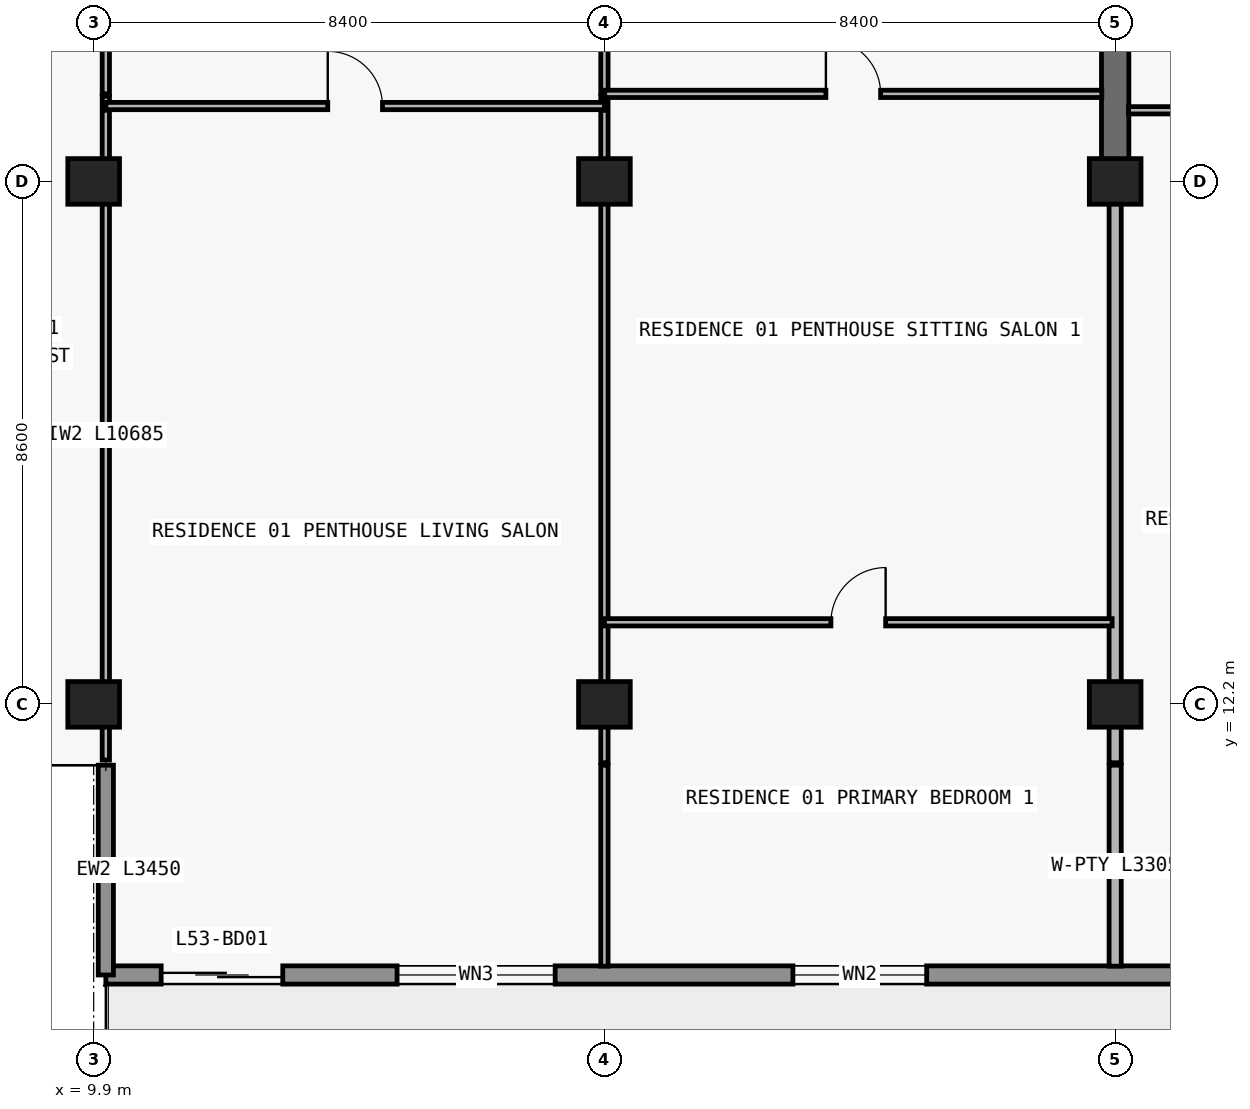
"""IFC4 building model, lengths in metres.
Left out: names, types, materials, properties, quantities, classifications, styles, units other than length and angle.
Written with IfcOpenShell. Run it as: python <this file> out.ifc"""

import sys

from ifc_helpers import new_model, si_unit, direction, frame, frame_2d, origin, origin_2d, place, context, subcontext, project, spatial, rectangle, extrude, element, fill, save


model = new_model("IFC4")
c1 = context("Model", 3, precision=1e-05, world=origin(), true_north=direction((0.0, 1.0)))
c2 = subcontext(c1, "Body", "Model", "MODEL_VIEW")
j1 = project(units=[si_unit("LENGTHUNIT", "METRE"), si_unit("PLANEANGLEUNIT", "RADIAN")], contexts=[c1])
p1 = place(None, origin())
s1 = spatial("IfcSite", under=j1, at=p1, CompositionType="ELEMENT")
p2 = place(p1, origin())
s2 = spatial("IfcBuilding", under=s1, at=p2, CompositionType="ELEMENT")
p3 = place(p2, frame((0.0, 0.0, 191.7)))
s3 = spatial("IfcBuildingStorey", under=s2, at=p3, CompositionType="ELEMENT", Elevation=191.7)
for number, where, z_axis, x_axis in (
    (1, (9.9, 12.2, 0.0), (0.0, 0.0, 1.0), (1.0, 0.0, 0.0)),
    (2, (18.3, 12.2, 0.0), (0.0, 0.0, 1.0), (1.0, 0.0, 0.0)),
    (3, (26.7, 12.2, 0.0), (0.0, 0.0, 1.0), (1.0, 0.0, 0.0)),
    (4, (9.9, 20.8, 0.0), (0.0, 0.0, 1.0), (1.0, 0.0, 0.0)),
    (5, (18.3, 20.8, 0.0), (0.0, 0.0, 1.0), (1.0, 0.0, 0.0)),
    (6, (26.7, 20.8, 0.0), (0.0, 0.0, 1.0), (1.0, 0.0, 0.0)),
):
    element("IfcColumn", number, at=place(p3, frame(where, z_axis=z_axis, x_axis=x_axis)), inside=s3, PredefinedType="COLUMN", context=c2, shape_type="SweptSolid", body=[
        extrude(rectangle(XDim=0.85, YDim=0.75, at=origin_2d()), origin(), (0.0, 0.0, 1.0), 3.05),
    ])
p4 = place(p3, frame((26.7, 20.8, 0.0), z_axis=(0.0, 0.0, 1.0), x_axis=(0.0, 1.0, 0.0)))
e7 = element("IfcWall", 7, at=p4, inside=s3, PredefinedType="SHEAR", context=c2, shape_type="SweptSolid", body=[
    extrude(rectangle(XDim=8.6, YDim=0.45, at=frame_2d((4.3, 0.0))), origin(), (0.0, 0.0, 1.0), 3.05),
])
p5 = place(p3, frame((67.7, 7.75, 0.0), z_axis=(0.0, 0.0, 1.0), x_axis=(-1.0, 0.0, 0.0)))
e8 = element("IfcWall", 8, at=p5, inside=s3, PredefinedType="STANDARD", context=c2, shape_type="SweptSolid", body=[
    extrude(rectangle(XDim=57.6, YDim=0.3, at=frame_2d((28.8, 0.0))), origin(), (0.0, 0.0, 1.0), 3.05),
])
p6 = place(p5, frame((54.69, 0.0, 0.0)))
e9 = element("IfcOpeningElement", 9, at=p6, cuts=e8, PredefinedType="OPENING", context=c2, shape_type="SweptSolid", body=[
    extrude(rectangle(XDim=2.0, YDim=2.3, at=frame_2d((1.0, 1.15))), frame((0.0, 0.16, 0.0), z_axis=(0.0, -1.0, 0.0), x_axis=(1.0, 0.0, 0.0)), (0.0, 0.0, 1.0), 0.32),
])
p7 = place(p5, frame((50.21, 0.0, 0.65)))
e10 = element("IfcOpeningElement", 10, at=p7, cuts=e8, PredefinedType="OPENING", context=c2, shape_type="SweptSolid", body=[
    extrude(rectangle(XDim=2.6, YDim=1.85, at=frame_2d((1.3, 0.925))), frame((0.0, 0.16, 0.0), z_axis=(0.0, -1.0, 0.0), x_axis=(1.0, 0.0, 0.0)), (0.0, 0.0, 1.0), 0.32),
])
p8 = place(p5, frame((44.1, 0.0, 0.85)))
e11 = element("IfcOpeningElement", 11, at=p8, cuts=e8, PredefinedType="OPENING", context=c2, shape_type="SweptSolid", body=[
    extrude(rectangle(XDim=2.2, YDim=1.55, at=frame_2d((1.1, 0.775))), frame((0.0, 0.16, 0.0), z_axis=(0.0, -1.0, 0.0), x_axis=(1.0, 0.0, 0.0)), (0.0, 0.0, 1.0), 0.32),
])
p9 = place(p5, frame((37.69, 0.0, 0.0)))
e12 = element("IfcOpeningElement", 12, at=p9, cuts=e8, PredefinedType="OPENING", context=c2, shape_type="SweptSolid", body=[
    extrude(rectangle(XDim=2.0, YDim=2.3, at=frame_2d((1.0, 1.15))), frame((0.0, 0.16, 0.0), z_axis=(0.0, -1.0, 0.0), x_axis=(1.0, 0.0, 0.0)), (0.0, 0.0, 1.0), 0.32),
])
p10 = place(p5, frame((33.59, 0.0, 0.85)))
e13 = element("IfcOpeningElement", 13, at=p10, cuts=e8, PredefinedType="OPENING", context=c2, shape_type="SweptSolid", body=[
    extrude(rectangle(XDim=1.8, YDim=1.55, at=frame_2d((0.9, 0.775))), frame((0.0, 0.16, 0.0), z_axis=(0.0, -1.0, 0.0), x_axis=(1.0, 0.0, 0.0)), (0.0, 0.0, 1.0), 0.32),
])
p11 = place(p5, frame((29.69, 0.0, 0.0)))
e14 = element("IfcOpeningElement", 14, at=p11, cuts=e8, PredefinedType="OPENING", context=c2, shape_type="SweptSolid", body=[
    extrude(rectangle(XDim=2.0, YDim=2.3, at=frame_2d((1.0, 1.15))), frame((0.0, 0.16, 0.0), z_axis=(0.0, -1.0, 0.0), x_axis=(1.0, 0.0, 0.0)), (0.0, 0.0, 1.0), 0.32),
])
p12 = place(p5, frame((25.81, 0.0, 0.65)))
e15 = element("IfcOpeningElement", 15, at=p12, cuts=e8, PredefinedType="OPENING", context=c2, shape_type="SweptSolid", body=[
    extrude(rectangle(XDim=2.6, YDim=1.85, at=frame_2d((1.3, 0.925))), frame((0.0, 0.16, 0.0), z_axis=(0.0, -1.0, 0.0), x_axis=(1.0, 0.0, 0.0)), (0.0, 0.0, 1.0), 0.32),
])
p13 = place(p5, frame((19.7, 0.0, 0.85)))
e16 = element("IfcOpeningElement", 16, at=p13, cuts=e8, PredefinedType="OPENING", context=c2, shape_type="SweptSolid", body=[
    extrude(rectangle(XDim=2.2, YDim=1.55, at=frame_2d((1.1, 0.775))), frame((0.0, 0.16, 0.0), z_axis=(0.0, -1.0, 0.0), x_axis=(1.0, 0.0, 0.0)), (0.0, 0.0, 1.0), 0.32),
])
p14 = place(p5, frame((13.29, 0.0, 0.0)))
e17 = element("IfcOpeningElement", 17, at=p14, cuts=e8, PredefinedType="OPENING", context=c2, shape_type="SweptSolid", body=[
    extrude(rectangle(XDim=2.0, YDim=2.3, at=frame_2d((1.0, 1.15))), frame((0.0, 0.16, 0.0), z_axis=(0.0, -1.0, 0.0), x_axis=(1.0, 0.0, 0.0)), (0.0, 0.0, 1.0), 0.32),
])
p15 = place(p5, frame((9.19, 0.0, 0.85)))
e18 = element("IfcOpeningElement", 18, at=p15, cuts=e8, PredefinedType="OPENING", context=c2, shape_type="SweptSolid", body=[
    extrude(rectangle(XDim=1.8, YDim=1.55, at=frame_2d((0.9, 0.775))), frame((0.0, 0.16, 0.0), z_axis=(0.0, -1.0, 0.0), x_axis=(1.0, 0.0, 0.0)), (0.0, 0.0, 1.0), 0.32),
])
p16 = place(p5, frame((5.273, 0.0, 0.0)))
e19 = element("IfcOpeningElement", 19, at=p16, cuts=e8, PredefinedType="OPENING", context=c2, shape_type="SweptSolid", body=[
    extrude(rectangle(XDim=2.0, YDim=2.3, at=frame_2d((1.0, 1.15))), frame((0.0, 0.16, 0.0), z_axis=(0.0, -1.0, 0.0), x_axis=(1.0, 0.0, 0.0)), (0.0, 0.0, 1.0), 0.32),
])
p17 = place(p5, frame((1.073, 0.0, 0.85)))
e20 = element("IfcOpeningElement", 20, at=p17, cuts=e8, PredefinedType="OPENING", context=c2, shape_type="SweptSolid", body=[
    extrude(rectangle(XDim=2.2, YDim=1.55, at=frame_2d((1.1, 0.775))), frame((0.0, 0.16, 0.0), z_axis=(0.0, -1.0, 0.0), x_axis=(1.0, 0.0, 0.0)), (0.0, 0.0, 1.0), 0.32),
])
p18 = place(p3, frame((10.1, 11.2, 0.0), z_axis=(0.0, 0.0, 1.0), x_axis=(0.0, -1.0, 0.0)))
e21 = element("IfcWall", 21, at=p18, inside=s3, PredefinedType="ELEMENTEDWALL", context=c2, shape_type="SweptSolid", body=[
    extrude(rectangle(XDim=3.45, YDim=0.25, at=frame_2d((1.725, 0.0))), origin(), (0.0, 0.0, 1.0), 3.05),
])
p19 = place(p3, frame((10.1, 11.285, 0.0), z_axis=(0.0, 0.0, 1.0), x_axis=(0.0, 1.0, 0.0)))
e22 = element("IfcWall", 22, at=p19, inside=s3, PredefinedType="PARTITIONING", context=c2, shape_type="SweptSolid", body=[
    extrude(rectangle(XDim=10.685, YDim=0.12, at=frame_2d((5.343, 0.0))), origin(), (0.0, 0.0, 1.0), 2.263),
])
p20 = place(p3, frame((10.1, 22.04, 0.0), z_axis=(0.0, 0.0, 1.0), x_axis=(0.0, 1.0, 0.0)))
e23 = element("IfcWall", 23, at=p20, inside=s3, PredefinedType="PARTITIONING", context=c2, shape_type="SweptSolid", body=[
    extrude(rectangle(XDim=0.16, YDim=0.12, at=frame_2d((0.08, 0.0))), origin(), (0.0, 0.0, 1.0), 2.263),
])
p21 = place(p3, frame((10.1, 22.24, 0.0), z_axis=(0.0, 0.0, 1.0), x_axis=(0.0, 1.0, 0.0)))
e24 = element("IfcWall", 24, at=p21, inside=s3, PredefinedType="PARTITIONING", context=c2, shape_type="SweptSolid", body=[
    extrude(rectangle(XDim=4.36, YDim=0.12, at=frame_2d((2.18, 0.0))), origin(), (0.0, 0.0, 1.0), 2.263),
])
p22 = place(p21, frame((1.73, 0.0, 0.0)))
e25 = element("IfcOpeningElement", 25, at=p22, cuts=e24, PredefinedType="OPENING", context=c2, shape_type="SweptSolid", body=[
    extrude(rectangle(XDim=0.9, YDim=2.15, at=frame_2d((0.45, 1.075))), frame((0.0, 0.07, 0.0), z_axis=(0.0, -1.0, 0.0), x_axis=(1.0, 0.0, 0.0)), (0.0, 0.0, 1.0), 0.14),
])
p23 = place(p3, frame((18.3, 7.895, 0.0), z_axis=(0.0, 0.0, 1.0), x_axis=(0.0, 1.0, 0.0)))
e26 = element("IfcWall", 26, at=p23, inside=s3, PredefinedType="PARTITIONING", context=c2, shape_type="SweptSolid", body=[
    extrude(rectangle(XDim=3.305, YDim=0.12, at=frame_2d((1.652, 0.0))), origin(), (0.0, 0.0, 1.0), 3.05),
])
p24 = place(p3, frame((18.3, 11.24, 0.0), z_axis=(0.0, 0.0, 1.0), x_axis=(0.0, 1.0, 0.0)))
e27 = element("IfcWall", 27, at=p24, inside=s3, PredefinedType="PARTITIONING", context=c2, shape_type="SweptSolid", body=[
    extrude(rectangle(XDim=10.73, YDim=0.12, at=frame_2d((5.365, 0.0))), origin(), (0.0, 0.0, 1.0), 2.263),
])
p25 = place(p3, frame((18.3, 22.04, 0.0), z_axis=(0.0, 0.0, 1.0), x_axis=(0.0, 1.0, 0.0)))
e28 = element("IfcWall", 28, at=p25, inside=s3, PredefinedType="PARTITIONING", context=c2, shape_type="SweptSolid", body=[
    extrude(rectangle(XDim=0.16, YDim=0.12, at=frame_2d((0.08, 0.0))), origin(), (0.0, 0.0, 1.0), 2.263),
])
p26 = place(p3, frame((18.3, 22.24, 0.0), z_axis=(0.0, 0.0, 1.0), x_axis=(0.0, 1.0, 0.0)))
e29 = element("IfcWall", 29, at=p26, inside=s3, PredefinedType="PARTITIONING", context=c2, shape_type="SweptSolid", body=[
    extrude(rectangle(XDim=4.36, YDim=0.12, at=frame_2d((2.18, 0.0))), origin(), (0.0, 0.0, 1.0), 2.263),
])
p27 = place(p26, frame((1.73, 0.0, 0.0)))
e30 = element("IfcOpeningElement", 30, at=p27, cuts=e29, PredefinedType="OPENING", context=c2, shape_type="SweptSolid", body=[
    extrude(rectangle(XDim=0.9, YDim=2.15, at=frame_2d((0.45, 1.075))), frame((0.0, 0.07, 0.0), z_axis=(0.0, -1.0, 0.0), x_axis=(1.0, 0.0, 0.0)), (0.0, 0.0, 1.0), 0.14),
])
p28 = place(p3, frame((26.7, 7.895, 0.0), z_axis=(0.0, 0.0, 1.0), x_axis=(0.0, 1.0, 0.0)))
e31 = element("IfcWall", 31, at=p28, inside=s3, PredefinedType="PARTITIONING", context=c2, shape_type="SweptSolid", body=[
    extrude(rectangle(XDim=3.305, YDim=0.2, at=frame_2d((1.652, 0.0))), origin(), (0.0, 0.0, 1.0), 3.05),
])
p29 = place(p3, frame((26.7, 11.24, 0.0), z_axis=(0.0, 0.0, 1.0), x_axis=(0.0, 1.0, 0.0)))
e32 = element("IfcWall", 32, at=p29, inside=s3, PredefinedType="PARTITIONING", context=c2, shape_type="SweptSolid", body=[
    extrude(rectangle(XDim=9.555, YDim=0.2, at=frame_2d((4.777, 0.0))), origin(), (0.0, 0.0, 1.0), 2.263),
])
p30 = place(p3, frame((18.3, 13.55, 0.0), z_axis=(0.0, 0.0, 1.0), x_axis=(1.0, 0.0, 0.0)))
e33 = element("IfcWall", 33, at=p30, inside=s3, PredefinedType="PARTITIONING", context=c2, shape_type="SweptSolid", body=[
    extrude(rectangle(XDim=8.35, YDim=0.12, at=frame_2d((4.175, 0.0))), origin(), (0.0, 0.0, 1.0), 3.05),
])
p31 = place(p30, frame((3.725, 0.0, 0.0)))
e34 = element("IfcOpeningElement", 34, at=p31, cuts=e33, PredefinedType="OPENING", context=c2, shape_type="SweptSolid", body=[
    extrude(rectangle(XDim=0.9, YDim=2.15, at=frame_2d((0.45, 1.075))), frame((0.0, 0.07, 0.0), z_axis=(0.0, -1.0, 0.0), x_axis=(1.0, 0.0, 0.0)), (0.0, 0.0, 1.0), 0.14),
])
p32 = place(p3, frame((26.92, 21.97, 0.0), z_axis=(0.0, 0.0, 1.0), x_axis=(1.0, 0.0, 0.0)))
e35 = element("IfcWall", 35, at=p32, inside=s3, PredefinedType="PARTITIONING", context=c2, shape_type="SweptSolid", body=[
    extrude(rectangle(XDim=4.4, YDim=0.12, at=frame_2d((2.2, 0.0))), origin(), (0.0, 0.0, 1.0), 3.05),
])
p33 = place(p32, frame((1.75, 0.0, 0.0)))
e36 = element("IfcOpeningElement", 36, at=p33, cuts=e35, PredefinedType="OPENING", context=c2, shape_type="SweptSolid", body=[
    extrude(rectangle(XDim=0.9, YDim=2.15, at=frame_2d((0.45, 1.075))), frame((0.0, 0.07, 0.0), z_axis=(0.0, -1.0, 0.0), x_axis=(1.0, 0.0, 0.0)), (0.0, 0.0, 1.0), 0.14),
])
p34 = place(p3, frame((10.1, 22.04, 0.0), z_axis=(0.0, 0.0, 1.0), x_axis=(1.0, 0.0, 0.0)))
e37 = element("IfcWall", 37, at=p34, inside=s3, PredefinedType="PARTITIONING", context=c2, shape_type="SweptSolid", body=[
    extrude(rectangle(XDim=8.2, YDim=0.12, at=frame_2d((4.1, 0.0))), origin(), (0.0, 0.0, 1.0), 3.05),
])
p35 = place(p34, frame((3.65, 0.0, 0.0)))
e38 = element("IfcOpeningElement", 38, at=p35, cuts=e37, PredefinedType="OPENING", context=c2, shape_type="SweptSolid", body=[
    extrude(rectangle(XDim=0.9, YDim=2.15, at=frame_2d((0.45, 1.075))), frame((0.0, 0.07, 0.0), z_axis=(0.0, -1.0, 0.0), x_axis=(1.0, 0.0, 0.0)), (0.0, 0.0, 1.0), 0.14),
])
p36 = place(p3, frame((18.305, 22.24, 0.0), z_axis=(0.0, 0.0, 1.0), x_axis=(1.0, 0.0, 0.0)))
e39 = element("IfcWall", 39, at=p36, inside=s3, PredefinedType="PARTITIONING", context=c2, shape_type="SweptSolid", body=[
    extrude(rectangle(XDim=8.175, YDim=0.12, at=frame_2d((4.087, 0.0))), origin(), (0.0, 0.0, 1.0), 3.05),
])
p37 = place(p36, frame((3.637, 0.0, 0.0)))
e40 = element("IfcOpeningElement", 40, at=p37, cuts=e39, PredefinedType="OPENING", context=c2, shape_type="SweptSolid", body=[
    extrude(rectangle(XDim=0.9, YDim=2.15, at=frame_2d((0.45, 1.075))), frame((0.0, 0.07, 0.0), z_axis=(0.0, -1.0, 0.0), x_axis=(1.0, 0.0, 0.0)), (0.0, 0.0, 1.0), 0.14),
])
p38 = place(p6, origin())
e41 = element("IfcDoor", 41, at=p38, inside=s3, OperationType="DOUBLE_DOOR_SLIDING", PredefinedType="DOOR", context=c2, shape_type="SweptSolid", body=[
    extrude(rectangle(XDim=2.0, YDim=2.3, at=frame_2d((1.0, 1.15))), frame((0.0, 0.025, 0.0), z_axis=(0.0, -1.0, 0.0), x_axis=(1.0, 0.0, 0.0)), (0.0, 0.0, 1.0), 0.05),
])
fill(e9, e41)
p39 = place(p7, origin())
e42 = element("IfcWindow", 42, at=p39, inside=s3, PartitioningType="SINGLE_PANEL", PredefinedType="WINDOW", context=c2, shape_type="SweptSolid", body=[
    extrude(rectangle(XDim=2.6, YDim=1.85, at=frame_2d((1.3, 0.925))), frame((0.0, 0.03, 0.0), z_axis=(0.0, -1.0, 0.0), x_axis=(1.0, 0.0, 0.0)), (0.0, 0.0, 1.0), 0.06),
])
fill(e10, e42)
p40 = place(p8, origin())
e43 = element("IfcWindow", 43, at=p40, inside=s3, PartitioningType="SINGLE_PANEL", PredefinedType="WINDOW", context=c2, shape_type="SweptSolid", body=[
    extrude(rectangle(XDim=2.2, YDim=1.55, at=frame_2d((1.1, 0.775))), frame((0.0, 0.03, 0.0), z_axis=(0.0, -1.0, 0.0), x_axis=(1.0, 0.0, 0.0)), (0.0, 0.0, 1.0), 0.06),
])
fill(e11, e43)
p41 = place(p35, origin())
e44 = element("IfcDoor", 44, at=p41, inside=s3, OperationType="SINGLE_SWING_LEFT", PredefinedType="DOOR", context=c2, shape_type="SweptSolid", body=[
    extrude(rectangle(XDim=0.9, YDim=2.15, at=frame_2d((0.45, 1.075))), frame((0.0, 0.025, 0.0), z_axis=(0.0, -1.0, 0.0), x_axis=(1.0, 0.0, 0.0)), (0.0, 0.0, 1.0), 0.05),
])
fill(e38, e44)
p42 = place(p37, origin())
e45 = element("IfcDoor", 45, at=p42, inside=s3, OperationType="SINGLE_SWING_LEFT", PredefinedType="DOOR", context=c2, shape_type="SweptSolid", body=[
    extrude(rectangle(XDim=0.9, YDim=2.15, at=frame_2d((0.45, 1.075))), frame((0.0, 0.025, 0.0), z_axis=(0.0, -1.0, 0.0), x_axis=(1.0, 0.0, 0.0)), (0.0, 0.0, 1.0), 0.05),
])
fill(e40, e45)
p43 = place(p31, origin())
e46 = element("IfcDoor", 46, at=p43, inside=s3, OperationType="SINGLE_SWING_RIGHT", PredefinedType="DOOR", context=c2, shape_type="SweptSolid", body=[
    extrude(rectangle(XDim=0.9, YDim=2.15, at=frame_2d((0.45, 1.075))), frame((0.0, 0.025, 0.0), z_axis=(0.0, -1.0, 0.0), x_axis=(1.0, 0.0, 0.0)), (0.0, 0.0, 1.0), 0.05),
])
fill(e34, e46)
save(model, sys.argv[1])
